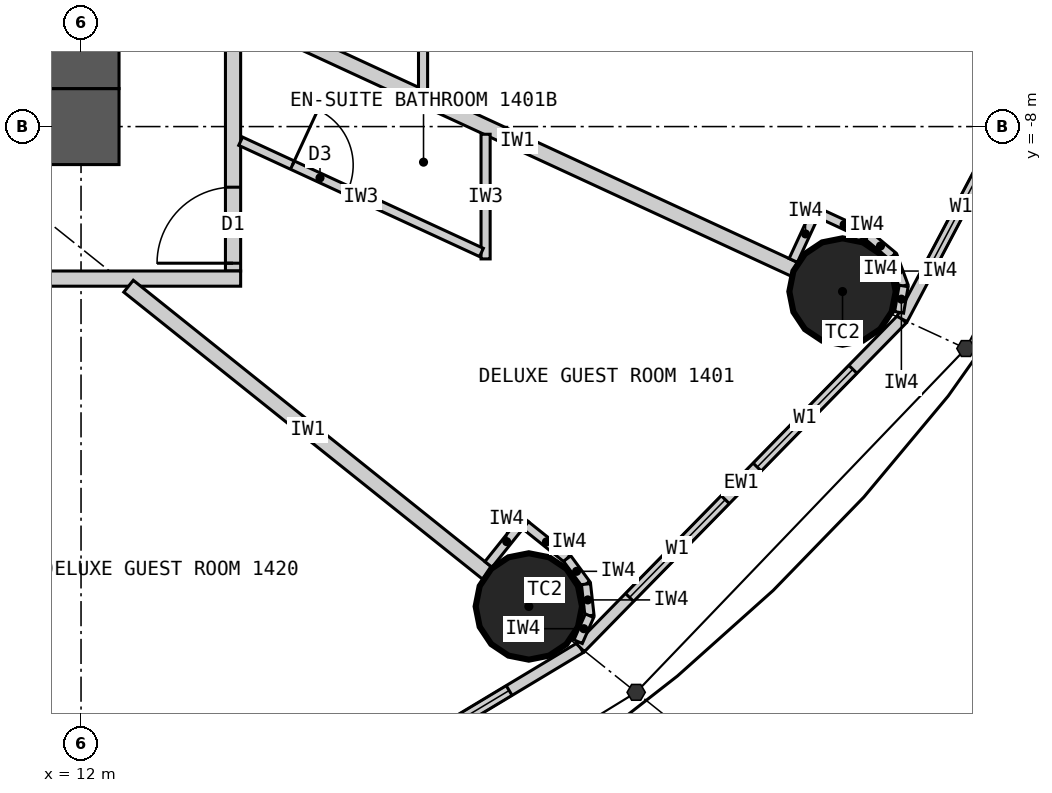
"""IFC4 building model, lengths in metres.
Left out: names, types, materials, properties, quantities, classifications, styles, units other than length and angle.
Written with IfcOpenShell. Run it as: python <this file> out.ifc"""

import sys

from ifc_helpers import new_model, si_unit, direction, frame, frame_2d, origin, origin_2d, place, context, subcontext, project, spatial, rectangle, circle, extrude, element, fill, save


model = new_model("IFC4")
c1 = context("Model", 3, precision=1e-05, world=origin(), true_north=direction((0.0, 1.0)))
c2 = subcontext(c1, "Body", "Model", "MODEL_VIEW")
j1 = project(units=[si_unit("LENGTHUNIT", "METRE"), si_unit("PLANEANGLEUNIT", "RADIAN")], contexts=[c1])
p1 = place(None, origin())
s1 = spatial("IfcSite", under=j1, at=p1, CompositionType="ELEMENT")
p2 = place(p1, origin())
s2 = spatial("IfcBuilding", under=s1, at=p2, CompositionType="ELEMENT")
p3 = place(p2, frame((0.0, 0.0, 60.6)))
s3 = spatial("IfcBuildingStorey", under=s2, at=p3, CompositionType="ELEMENT", Elevation=60.6)
for number, where, z_axis, x_axis in (
    (1, (17.892, -14.313, 0.0), (0.0, 0.0, 1.0), (1.0, 0.0, 0.0)),
    (2, (22.019, -10.17, 0.0), (0.0, 0.0, 1.0), (1.0, 0.0, 0.0)),
):
    element("IfcColumn", number, at=place(p3, frame(where, z_axis=z_axis, x_axis=x_axis)), inside=s3, PredefinedType="COLUMN", context=c2, shape_type="SweptSolid", body=[
        extrude(circle(Radius=0.7, at=origin_2d()), origin(), (0.0, 0.0, 1.0), 3.3),
    ])
p4 = place(p3, frame((12.5, -8.0, 0.0), z_axis=(0.0, 0.0, 1.0), x_axis=(-1.0, 0.0, 0.0)))
e3 = element("IfcWall", 3, at=p4, inside=s3, PredefinedType="SHEAR", context=c2, shape_type="SweptSolid", body=[
    extrude(rectangle(XDim=25.0, YDim=1.0, at=frame_2d((12.5, 0.0))), origin(), (0.0, 0.0, 1.0), 3.3),
])
p5 = place(p4, frame((11.2, 0.0, 0.0)))
e4 = element("IfcOpeningElement", 4, at=p5, cuts=e3, PredefinedType="OPENING", context=c2, shape_type="SweptSolid", body=[
    extrude(rectangle(XDim=1.2, YDim=2.2, at=frame_2d((0.6, 1.1))), frame((0.0, 0.51, 0.0), z_axis=(0.0, -1.0, 0.0), x_axis=(1.0, 0.0, 0.0)), (0.0, 0.0, 1.0), 1.02),
])
p6 = place(p4, frame((18.8, 0.0, 0.0)))
e5 = element("IfcOpeningElement", 5, at=p6, cuts=e3, PredefinedType="OPENING", context=c2, shape_type="SweptSolid", body=[
    extrude(rectangle(XDim=0.9, YDim=2.2, at=frame_2d((0.45, 1.1))), frame((0.0, 0.51, 0.0), z_axis=(0.0, -1.0, 0.0), x_axis=(1.0, 0.0, 0.0)), (0.0, 0.0, 1.0), 1.02),
])
p7 = place(p3, frame((12.0, -7.5, 0.0), z_axis=(0.0, 0.0, 1.0), x_axis=(0.0, 1.0, 0.0)))
e6 = element("IfcWall", 6, at=p7, inside=s3, PredefinedType="SHEAR", context=c2, shape_type="SweptSolid", body=[
    extrude(rectangle(XDim=15.0, YDim=1.0, at=frame_2d((7.5, 0.0))), origin(), (0.0, 0.0, 1.0), 3.3),
])
p8 = place(p7, frame((6.6, 0.0, 0.0)))
e7 = element("IfcOpeningElement", 7, at=p8, cuts=e6, PredefinedType="OPENING", context=c2, shape_type="SweptSolid", body=[
    extrude(rectangle(XDim=1.8, YDim=2.2, at=frame_2d((0.9, 1.1))), frame((0.0, 0.51, 0.0), z_axis=(0.0, -1.0, 0.0), x_axis=(1.0, 0.0, 0.0)), (0.0, 0.0, 1.0), 1.02),
])
p9 = place(p3, frame((13.096, -18.147, 0.0), z_axis=(0.0, 0.0, 1.0), x_axis=(0.856983180864, 0.515344377787, 0.0)))
e8 = element("IfcWall", 8, at=p9, inside=s3, PredefinedType="ELEMENTEDWALL", context=c2, shape_type="SweptSolid", body=[
    extrude(rectangle(XDim=6.386, YDim=0.15, at=frame_2d((3.193, 0.0))), origin(), (0.0, 0.0, 1.0), 3.12),
])
p10 = place(p9, frame((1.093, 0.0, 0.9)))
e9 = element("IfcOpeningElement", 9, at=p10, cuts=e8, PredefinedType="OPENING", context=c2, shape_type="SweptSolid", body=[
    extrude(rectangle(XDim=1.8, YDim=1.9, at=frame_2d((0.9, 0.95))), frame((0.0, 0.085, 0.0), z_axis=(0.0, -1.0, 0.0), x_axis=(1.0, 0.0, 0.0)), (0.0, 0.0, 1.0), 0.17),
])
p11 = place(p9, frame((3.493, 0.0, 0.9)))
e10 = element("IfcOpeningElement", 10, at=p11, cuts=e8, PredefinedType="OPENING", context=c2, shape_type="SweptSolid", body=[
    extrude(rectangle(XDim=1.8, YDim=1.9, at=frame_2d((0.9, 0.95))), frame((0.0, 0.085, 0.0), z_axis=(0.0, -1.0, 0.0), x_axis=(1.0, 0.0, 0.0)), (0.0, 0.0, 1.0), 0.17),
])
p12 = place(p3, frame((18.57, -14.856, 0.0), z_axis=(0.0, 0.0, 1.0), x_axis=(0.699602905915, 0.714531856557, 0.0)))
e11 = element("IfcWall", 11, at=p12, inside=s3, PredefinedType="ELEMENTEDWALL", context=c2, shape_type="SweptSolid", body=[
    extrude(rectangle(XDim=6.051, YDim=0.15, at=frame_2d((3.025, 0.0))), origin(), (0.0, 0.0, 1.0), 3.12),
])
p13 = place(p12, frame((0.926, 0.0, 0.9)))
e12 = element("IfcOpeningElement", 12, at=p13, cuts=e11, PredefinedType="OPENING", context=c2, shape_type="SweptSolid", body=[
    extrude(rectangle(XDim=1.8, YDim=1.9, at=frame_2d((0.9, 0.95))), frame((0.0, 0.085, 0.0), z_axis=(0.0, -1.0, 0.0), x_axis=(1.0, 0.0, 0.0)), (0.0, 0.0, 1.0), 0.17),
])
p14 = place(p12, frame((3.325, 0.0, 0.9)))
e13 = element("IfcOpeningElement", 13, at=p14, cuts=e11, PredefinedType="OPENING", context=c2, shape_type="SweptSolid", body=[
    extrude(rectangle(XDim=1.8, YDim=1.9, at=frame_2d((0.9, 0.95))), frame((0.0, 0.085, 0.0), z_axis=(0.0, -1.0, 0.0), x_axis=(1.0, 0.0, 0.0)), (0.0, 0.0, 1.0), 0.17),
])
p15 = place(p3, frame((22.803, -10.532, 0.0), z_axis=(0.0, 0.0, 1.0), x_axis=(0.467296867008, 0.884100468321, 0.0)))
e14 = element("IfcWall", 14, at=p15, inside=s3, PredefinedType="ELEMENTEDWALL", context=c2, shape_type="SweptSolid", body=[
    extrude(rectangle(XDim=5.734, YDim=0.15, at=frame_2d((2.867, 0.0))), origin(), (0.0, 0.0, 1.0), 3.12),
])
p16 = place(p15, frame((0.767, 0.0, 0.9)))
e15 = element("IfcOpeningElement", 15, at=p16, cuts=e14, PredefinedType="OPENING", context=c2, shape_type="SweptSolid", body=[
    extrude(rectangle(XDim=1.8, YDim=1.9, at=frame_2d((0.9, 0.95))), frame((0.0, 0.085, 0.0), z_axis=(0.0, -1.0, 0.0), x_axis=(1.0, 0.0, 0.0)), (0.0, 0.0, 1.0), 0.17),
])
p17 = place(p15, frame((3.167, 0.0, 0.9)))
e16 = element("IfcOpeningElement", 16, at=p17, cuts=e14, PredefinedType="OPENING", context=c2, shape_type="SweptSolid", body=[
    extrude(rectangle(XDim=1.8, YDim=1.9, at=frame_2d((0.9, 0.95))), frame((0.0, 0.085, 0.0), z_axis=(0.0, -1.0, 0.0), x_axis=(1.0, 0.0, 0.0)), (0.0, 0.0, 1.0), 0.17),
])
p18 = place(p3, frame((14.0, -9.9, 0.0), z_axis=(0.0, 0.0, 1.0), x_axis=(0.0, 1.0, 0.0)))
e17 = element("IfcWall", 17, at=p18, inside=s3, PredefinedType="PARTITIONING", context=c2, shape_type="SweptSolid", body=[
    extrude(rectangle(XDim=19.8, YDim=0.2, at=frame_2d((9.9, 0.0))), origin(), (0.0, 0.0, 1.0), 3.12),
])
p19 = place(p18, frame((0.103, 0.0, 0.0)))
e18 = element("IfcOpeningElement", 18, at=p19, cuts=e17, PredefinedType="OPENING", context=c2, shape_type="SweptSolid", body=[
    extrude(rectangle(XDim=1.0, YDim=2.2, at=frame_2d((0.5, 1.1))), frame((0.0, 0.11, 0.0), z_axis=(0.0, -1.0, 0.0), x_axis=(1.0, 0.0, 0.0)), (0.0, 0.0, 1.0), 0.22),
])
p20 = place(p18, frame((5.248, 0.0, 0.0)))
e19 = element("IfcOpeningElement", 19, at=p20, cuts=e17, PredefinedType="OPENING", context=c2, shape_type="SweptSolid", body=[
    extrude(rectangle(XDim=1.0, YDim=2.2, at=frame_2d((0.5, 1.1))), frame((0.0, 0.11, 0.0), z_axis=(0.0, -1.0, 0.0), x_axis=(1.0, 0.0, 0.0)), (0.0, 0.0, 1.0), 0.22),
])
p21 = place(p18, frame((8.438, 0.0, 0.0)))
e20 = element("IfcOpeningElement", 20, at=p21, cuts=e17, PredefinedType="OPENING", context=c2, shape_type="SweptSolid", body=[
    extrude(rectangle(XDim=1.0, YDim=2.2, at=frame_2d((0.5, 1.1))), frame((0.0, 0.11, 0.0), z_axis=(0.0, -1.0, 0.0), x_axis=(1.0, 0.0, 0.0)), (0.0, 0.0, 1.0), 0.22),
])
p22 = place(p18, frame((14.532, 0.0, 0.0)))
e21 = element("IfcOpeningElement", 21, at=p22, cuts=e17, PredefinedType="OPENING", context=c2, shape_type="SweptSolid", body=[
    extrude(rectangle(XDim=1.0, YDim=2.2, at=frame_2d((0.5, 1.1))), frame((0.0, 0.11, 0.0), z_axis=(0.0, -1.0, 0.0), x_axis=(1.0, 0.0, 0.0)), (0.0, 0.0, 1.0), 0.22),
])
p23 = place(p3, frame((14.1, -10.0, 0.0), z_axis=(0.0, 0.0, 1.0), x_axis=(-1.0, 0.0, 0.0)))
e22 = element("IfcWall", 22, at=p23, inside=s3, PredefinedType="PARTITIONING", context=c2, shape_type="SweptSolid", body=[
    extrude(rectangle(XDim=28.2, YDim=0.2, at=frame_2d((14.1, 0.0))), origin(), (0.0, 0.0, 1.0), 3.12),
])
p24 = place(p23, frame((23.865, 0.0, 0.0)))
e23 = element("IfcOpeningElement", 23, at=p24, cuts=e22, PredefinedType="OPENING", context=c2, shape_type="SweptSolid", body=[
    extrude(rectangle(XDim=1.0, YDim=2.2, at=frame_2d((0.5, 1.1))), frame((0.0, 0.11, 0.0), z_axis=(0.0, -1.0, 0.0), x_axis=(1.0, 0.0, 0.0)), (0.0, 0.0, 1.0), 0.22),
])
p25 = place(p23, frame((18.529, 0.0, 0.0)))
e24 = element("IfcOpeningElement", 24, at=p25, cuts=e22, PredefinedType="OPENING", context=c2, shape_type="SweptSolid", body=[
    extrude(rectangle(XDim=1.0, YDim=2.2, at=frame_2d((0.5, 1.1))), frame((0.0, 0.11, 0.0), z_axis=(0.0, -1.0, 0.0), x_axis=(1.0, 0.0, 0.0)), (0.0, 0.0, 1.0), 0.22),
])
p26 = place(p23, frame((14.623, 0.0, 0.0)))
e25 = element("IfcOpeningElement", 25, at=p26, cuts=e22, PredefinedType="OPENING", context=c2, shape_type="SweptSolid", body=[
    extrude(rectangle(XDim=1.0, YDim=2.2, at=frame_2d((0.5, 1.1))), frame((0.0, 0.11, 0.0), z_axis=(0.0, -1.0, 0.0), x_axis=(1.0, 0.0, 0.0)), (0.0, 0.0, 1.0), 0.22),
])
p27 = place(p23, frame((11.24, 0.0, 0.0)))
e26 = element("IfcOpeningElement", 26, at=p27, cuts=e22, PredefinedType="OPENING", context=c2, shape_type="SweptSolid", body=[
    extrude(rectangle(XDim=1.0, YDim=2.2, at=frame_2d((0.5, 1.1))), frame((0.0, 0.11, 0.0), z_axis=(0.0, -1.0, 0.0), x_axis=(1.0, 0.0, 0.0)), (0.0, 0.0, 1.0), 0.22),
])
p28 = place(p23, frame((8.671, 0.0, 0.0)))
e27 = element("IfcOpeningElement", 27, at=p28, cuts=e22, PredefinedType="OPENING", context=c2, shape_type="SweptSolid", body=[
    extrude(rectangle(XDim=1.0, YDim=2.2, at=frame_2d((0.5, 1.1))), frame((0.0, 0.11, 0.0), z_axis=(0.0, -1.0, 0.0), x_axis=(1.0, 0.0, 0.0)), (0.0, 0.0, 1.0), 0.22),
])
p29 = place(p23, frame((2.801, 0.0, 0.0)))
e28 = element("IfcOpeningElement", 28, at=p29, cuts=e22, PredefinedType="OPENING", context=c2, shape_type="SweptSolid", body=[
    extrude(rectangle(XDim=1.0, YDim=2.2, at=frame_2d((0.5, 1.1))), frame((0.0, 0.11, 0.0), z_axis=(0.0, -1.0, 0.0), x_axis=(1.0, 0.0, 0.0)), (0.0, 0.0, 1.0), 0.22),
])
p30 = place(p3, frame((7.289, -10.1, 0.0), z_axis=(0.0, 0.0, 1.0), x_axis=(0.585198353053, -0.810890182197, 0.0)))
e29 = element("IfcWall", 29, at=p30, inside=s3, PredefinedType="PARTITIONING", context=c2, shape_type="SweptSolid", body=[
    extrude(rectangle(XDim=8.36, YDim=0.2, at=frame_2d((4.18, 0.0))), origin(), (0.0, 0.0, 1.0), 2.32),
])
p31 = place(p3, frame((12.625, -10.1, 0.0), z_axis=(0.0, 0.0, 1.0), x_axis=(0.780892451574, -0.624665493744, 0.0)))
e30 = element("IfcWall", 30, at=p31, inside=s3, PredefinedType="PARTITIONING", context=c2, shape_type="SweptSolid", body=[
    extrude(rectangle(XDim=6.045, YDim=0.2, at=frame_2d((3.022, 0.0))), origin(), (0.0, 0.0, 1.0), 2.32),
])
p32 = place(p3, frame((14.1, -6.512, 0.0), z_axis=(0.0, 0.0, 1.0), x_axis=(0.907832871056, -0.419332181247, 0.0)))
e31 = element("IfcWall", 31, at=p32, inside=s3, PredefinedType="PARTITIONING", context=c2, shape_type="SweptSolid", body=[
    extrude(rectangle(XDim=8.023, YDim=0.2, at=frame_2d((4.011, 0.0))), origin(), (0.0, 0.0, 1.0), 2.32),
])
p33 = place(p3, frame((17.323, -8.101, 0.0), z_axis=(0.0, 0.0, 1.0), x_axis=(0.0, -1.0, 0.0)))
e32 = element("IfcWall", 32, at=p33, inside=s3, PredefinedType="PARTITIONING", context=c2, shape_type="SweptSolid", body=[
    extrude(rectangle(XDim=1.64, YDim=0.12, at=frame_2d((0.82, 0.0))), origin(), (0.0, 0.0, 1.0), 3.12),
])
p34 = place(p3, frame((14.1, -8.193, 0.0), z_axis=(0.0, 0.0, 1.0), x_axis=(0.907836493557, -0.419324338628, 0.0)))
e33 = element("IfcWall", 33, at=p34, inside=s3, PredefinedType="PARTITIONING", context=c2, shape_type="SweptSolid", body=[
    extrude(rectangle(XDim=3.49, YDim=0.12, at=frame_2d((1.745, 0.0))), origin(), (0.0, 0.0, 1.0), 3.12),
])
p35 = place(p34, frame((0.75, 0.0, 0.0)))
e34 = element("IfcOpeningElement", 34, at=p35, cuts=e33, PredefinedType="OPENING", context=c2, shape_type="SweptSolid", body=[
    extrude(rectangle(XDim=0.8, YDim=2.1, at=frame_2d((0.4, 1.05))), frame((0.0, 0.07, 0.0), z_axis=(0.0, -1.0, 0.0), x_axis=(1.0, 0.0, 0.0)), (0.0, 0.0, 1.0), 0.14),
])
p36 = place(p3, frame((16.5, -7.521, 0.0), z_axis=(0.0, 0.0, 1.0), x_axis=(0.0, 1.0, 0.0)))
e35 = element("IfcWall", 35, at=p36, inside=s3, PredefinedType="PARTITIONING", context=c2, shape_type="SweptSolid", body=[
    extrude(rectangle(XDim=2.749, YDim=0.12, at=frame_2d((1.374, 0.0))), origin(), (0.0, 0.0, 1.0), 3.12),
])
p37 = place(p3, frame((17.361, -13.76, 0.0), z_axis=(0.0, 0.0, 1.0), x_axis=(0.624501042889, 0.781023973659, 0.0)))
e36 = element("IfcWall", 36, at=p37, inside=s3, PredefinedType="PARTITIONING", context=c2, shape_type="SweptSolid", body=[
    extrude(rectangle(XDim=0.767, YDim=0.12, at=frame_2d((0.384, 0.0))), origin(), (0.0, 0.0, 1.0), 3.12),
])
p38 = place(p3, frame((17.85, -13.246, 0.0), z_axis=(0.0, 0.0, 1.0), x_axis=(0.780902834923, -0.62465251333, 0.0)))
e37 = element("IfcWall", 37, at=p38, inside=s3, PredefinedType="PARTITIONING", context=c2, shape_type="SweptSolid", body=[
    extrude(rectangle(XDim=0.7, YDim=0.12, at=frame_2d((0.35, 0.0))), origin(), (0.0, 0.0, 1.0), 3.12),
])
for number, where, z_axis, x_axis in (
    (38, (18.396, -13.683, 0.0), (0.0, 0.0, 1.0), (0.592, -0.806, 0.0)),
    (39, (18.644, -14.02, 0.0), (0.0, 0.0, 1.0), (0.11, -0.994, 0.0)),
):
    element("IfcWall", number, at=place(p3, frame(where, z_axis=z_axis, x_axis=x_axis)), inside=s3, PredefinedType="PARTITIONING", context=c2, shape_type="SweptSolid", body=[
        extrude(rectangle(XDim=0.418, YDim=0.12, at=frame_2d((0.209, 0.0))), origin(), (0.0, 0.0, 1.0), 3.12),
    ])
p39 = place(p3, frame((18.69, -14.435, 0.0), z_axis=(0.0, 0.0, 1.0), x_axis=(-0.401093412634, -0.91603715773, 0.0)))
e40 = element("IfcWall", 40, at=p39, inside=s3, PredefinedType="PARTITIONING", context=c2, shape_type="SweptSolid", body=[
    extrude(rectangle(XDim=0.373, YDim=0.12, at=frame_2d((0.187, 0.0))), origin(), (0.0, 0.0, 1.0), 3.12),
])
p40 = place(p3, frame((21.371, -9.761, 0.0), z_axis=(0.0, 0.0, 1.0), x_axis=(0.419259891039, 0.907866258744, 0.0)))
e41 = element("IfcWall", 41, at=p40, inside=s3, PredefinedType="PARTITIONING", context=c2, shape_type="SweptSolid", body=[
    extrude(rectangle(XDim=0.768, YDim=0.12, at=frame_2d((0.384, 0.0))), origin(), (0.0, 0.0, 1.0), 3.12),
])
p41 = place(p3, frame((21.722, -9.144, 0.0), z_axis=(0.0, 0.0, 1.0), x_axis=(0.907877701396, -0.419235112208, 0.0)))
e42 = element("IfcWall", 42, at=p41, inside=s3, PredefinedType="PARTITIONING", context=c2, shape_type="SweptSolid", body=[
    extrude(rectangle(XDim=0.7, YDim=0.12, at=frame_2d((0.35, 0.0))), origin(), (0.0, 0.0, 1.0), 3.12),
])
p42 = place(p3, frame((22.358, -9.437, 0.0), z_axis=(0.0, 0.0, 1.0), x_axis=(0.768412687942, -0.639954639806, 0.0)))
e43 = element("IfcWall", 43, at=p42, inside=s3, PredefinedType="PARTITIONING", context=c2, shape_type="SweptSolid", body=[
    extrude(rectangle(XDim=0.418, YDim=0.12, at=frame_2d((0.209, 0.0))), origin(), (0.0, 0.0, 1.0), 3.12),
])
p43 = place(p3, frame((22.679, -9.705, 0.0), z_axis=(0.0, 0.0, 1.0), x_axis=(0.345164001646, -0.938542386879, 0.0)))
e44 = element("IfcWall", 44, at=p43, inside=s3, PredefinedType="PARTITIONING", context=c2, shape_type="SweptSolid", body=[
    extrude(rectangle(XDim=0.418, YDim=0.12, at=frame_2d((0.209, 0.0))), origin(), (0.0, 0.0, 1.0), 3.12),
])
p44 = place(p3, frame((22.823, -10.097, 0.0), z_axis=(0.0, 0.0, 1.0), x_axis=(-0.169674995186, -0.985500074079, 0.0)))
e45 = element("IfcWall", 45, at=p44, inside=s3, PredefinedType="PARTITIONING", context=c2, shape_type="SweptSolid", body=[
    extrude(rectangle(XDim=0.353, YDim=0.12, at=frame_2d((0.176, 0.0))), origin(), (0.0, 0.0, 1.0), 3.12),
])
p45 = place(p11, origin())
e46 = element("IfcWindow", 46, at=p45, inside=s3, PartitioningType="SINGLE_PANEL", PredefinedType="WINDOW", context=c2, shape_type="SweptSolid", body=[
    extrude(rectangle(XDim=1.8, YDim=1.9, at=frame_2d((0.9, 0.95))), frame((0.0, 0.03, 0.0), z_axis=(0.0, -1.0, 0.0), x_axis=(1.0, 0.0, 0.0)), (0.0, 0.0, 1.0), 0.06),
])
fill(e10, e46)
p46 = place(p13, origin())
e47 = element("IfcWindow", 47, at=p46, inside=s3, PartitioningType="SINGLE_PANEL", PredefinedType="WINDOW", context=c2, shape_type="SweptSolid", body=[
    extrude(rectangle(XDim=1.8, YDim=1.9, at=frame_2d((0.9, 0.95))), frame((0.0, 0.03, 0.0), z_axis=(0.0, -1.0, 0.0), x_axis=(1.0, 0.0, 0.0)), (0.0, 0.0, 1.0), 0.06),
])
fill(e12, e47)
p47 = place(p14, origin())
e48 = element("IfcWindow", 48, at=p47, inside=s3, PartitioningType="SINGLE_PANEL", PredefinedType="WINDOW", context=c2, shape_type="SweptSolid", body=[
    extrude(rectangle(XDim=1.8, YDim=1.9, at=frame_2d((0.9, 0.95))), frame((0.0, 0.03, 0.0), z_axis=(0.0, -1.0, 0.0), x_axis=(1.0, 0.0, 0.0)), (0.0, 0.0, 1.0), 0.06),
])
fill(e13, e48)
p48 = place(p16, origin())
e49 = element("IfcWindow", 49, at=p48, inside=s3, PartitioningType="SINGLE_PANEL", PredefinedType="WINDOW", context=c2, shape_type="SweptSolid", body=[
    extrude(rectangle(XDim=1.8, YDim=1.9, at=frame_2d((0.9, 0.95))), frame((0.0, 0.03, 0.0), z_axis=(0.0, -1.0, 0.0), x_axis=(1.0, 0.0, 0.0)), (0.0, 0.0, 1.0), 0.06),
])
fill(e15, e49)
p49 = place(p35, origin())
e50 = element("IfcDoor", 50, at=p49, inside=s3, OperationType="SINGLE_SWING_LEFT", PredefinedType="DOOR", context=c2, shape_type="SweptSolid", body=[
    extrude(rectangle(XDim=0.8, YDim=2.1, at=frame_2d((0.4, 1.05))), frame((0.0, 0.025, 0.0), z_axis=(0.0, -1.0, 0.0), x_axis=(1.0, 0.0, 0.0)), (0.0, 0.0, 1.0), 0.05),
])
fill(e34, e50)
p50 = place(p19, origin())
e51 = element("IfcDoor", 51, at=p50, inside=s3, OperationType="SINGLE_SWING_LEFT", PredefinedType="DOOR", context=c2, shape_type="SweptSolid", body=[
    extrude(rectangle(XDim=1.0, YDim=2.2, at=frame_2d((0.5, 1.1))), frame((0.0, 0.025, 0.0), z_axis=(0.0, -1.0, 0.0), x_axis=(1.0, 0.0, 0.0)), (0.0, 0.0, 1.0), 0.05),
])
fill(e18, e51)
save(model, sys.argv[1])
